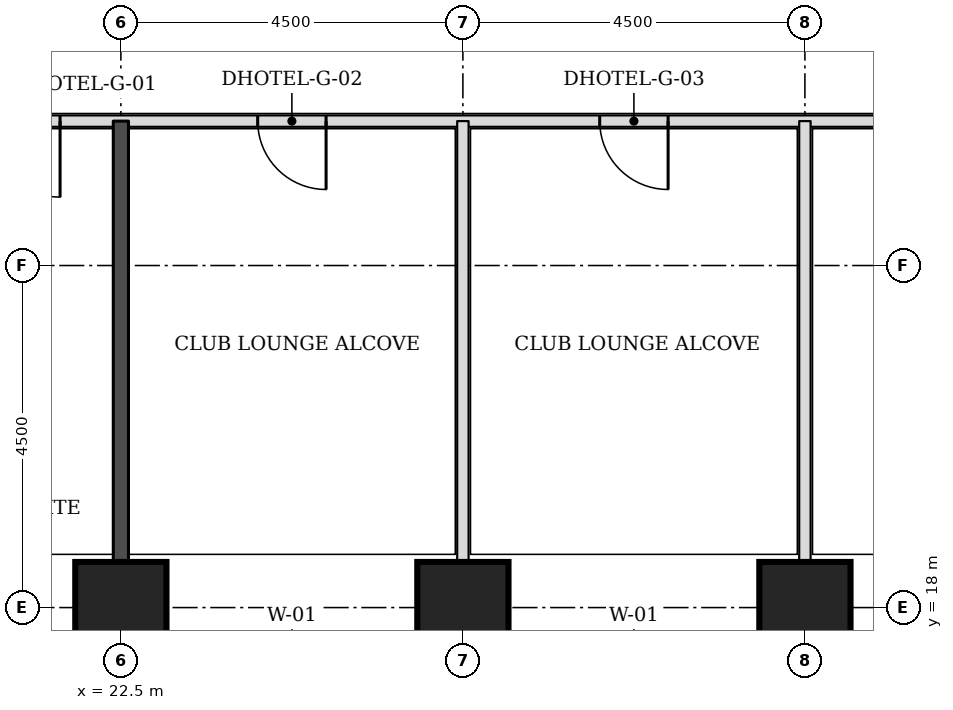
"""IFC4 building model, lengths in metres.
Left out: names, types, materials, properties, quantities, classifications, styles, units other than length and angle.
Written with IfcOpenShell. Run it as: python <this file> out.ifc"""

import sys

from ifc_helpers import new_model, si_unit, direction, frame, frame_2d, origin, origin_2d, place, context, subcontext, project, spatial, rectangle, extrude, element, fill, save


model = new_model("IFC4")
c1 = context("Model", 3, precision=1e-05, world=origin(), true_north=direction((0.0, 1.0)))
c2 = subcontext(c1, "Body", "Model", "MODEL_VIEW")
j1 = project(units=[si_unit("LENGTHUNIT", "METRE"), si_unit("PLANEANGLEUNIT", "RADIAN")], contexts=[c1])
p1 = place(None, origin())
s1 = spatial("IfcSite", under=j1, at=p1, CompositionType="ELEMENT")
p2 = place(p1, origin())
s2 = spatial("IfcBuilding", under=s1, at=p2, CompositionType="ELEMENT")
p3 = place(p2, frame((0.0, 0.0, 66.0)))
s3 = spatial("IfcBuildingStorey", under=s2, at=p3, CompositionType="ELEMENT", Elevation=66.0)
for number, where, z_axis, x_axis in (
    (1, (22.5, 18.0, 0.0), (0.0, 0.0, 1.0), (1.0, 0.0, 0.0)),
    (2, (27.0, 18.0, 0.0), (0.0, 0.0, 1.0), (1.0, 0.0, 0.0)),
    (3, (31.5, 18.0, 0.0), (0.0, 0.0, 1.0), (1.0, 0.0, 0.0)),
):
    element("IfcColumn", number, at=place(p3, frame(where, z_axis=z_axis, x_axis=x_axis)), inside=s3, PredefinedType="COLUMN", context=c2, shape_type="SweptSolid", body=[
        extrude(rectangle(XDim=1.2, YDim=1.2, at=origin_2d()), origin(), (0.0, 0.0, 1.0), 3.3),
    ])
p4 = place(p3, frame((19.9, 24.4, 0.0), z_axis=(0.0, 0.0, 1.0), x_axis=(1.0, 0.0, 0.0)))
e4 = element("IfcWall", 4, at=p4, inside=s3, PredefinedType="PARTITIONING", context=c2, shape_type="SweptSolid", body=[
    extrude(rectangle(XDim=32.2, YDim=0.15, at=frame_2d((16.1, 0.0))), origin(), (0.0, 0.0, 1.0), 3.08),
])
p5 = place(p4, frame((4.4, 0.0, 0.0)))
e5 = element("IfcOpeningElement", 5, at=p5, cuts=e4, PredefinedType="OPENING", context=c2, shape_type="SweptSolid", body=[
    extrude(rectangle(XDim=0.9, YDim=2.1, at=frame_2d((0.45, 1.05))), frame((0.0, 0.085, 0.0), z_axis=(0.0, -1.0, 0.0), x_axis=(1.0, 0.0, 0.0)), (0.0, 0.0, 1.0), 0.17),
])
p6 = place(p4, frame((8.9, 0.0, 0.0)))
e6 = element("IfcOpeningElement", 6, at=p6, cuts=e4, PredefinedType="OPENING", context=c2, shape_type="SweptSolid", body=[
    extrude(rectangle(XDim=0.9, YDim=2.1, at=frame_2d((0.45, 1.05))), frame((0.0, 0.085, 0.0), z_axis=(0.0, -1.0, 0.0), x_axis=(1.0, 0.0, 0.0)), (0.0, 0.0, 1.0), 0.17),
])
p7 = place(p4, frame((13.4, 0.0, 0.0)))
e7 = element("IfcOpeningElement", 7, at=p7, cuts=e4, PredefinedType="OPENING", context=c2, shape_type="SweptSolid", body=[
    extrude(rectangle(XDim=0.9, YDim=2.1, at=frame_2d((0.45, 1.05))), frame((0.0, 0.085, 0.0), z_axis=(0.0, -1.0, 0.0), x_axis=(1.0, 0.0, 0.0)), (0.0, 0.0, 1.0), 0.17),
])
p8 = place(p4, frame((17.9, 0.0, 0.0)))
e8 = element("IfcOpeningElement", 8, at=p8, cuts=e4, PredefinedType="OPENING", context=c2, shape_type="SweptSolid", body=[
    extrude(rectangle(XDim=0.9, YDim=2.1, at=frame_2d((0.45, 1.05))), frame((0.0, 0.085, 0.0), z_axis=(0.0, -1.0, 0.0), x_axis=(1.0, 0.0, 0.0)), (0.0, 0.0, 1.0), 0.17),
])
p9 = place(p4, frame((22.4, 0.0, 0.0)))
e9 = element("IfcOpeningElement", 9, at=p9, cuts=e4, PredefinedType="OPENING", context=c2, shape_type="SweptSolid", body=[
    extrude(rectangle(XDim=0.9, YDim=2.1, at=frame_2d((0.45, 1.05))), frame((0.0, 0.085, 0.0), z_axis=(0.0, -1.0, 0.0), x_axis=(1.0, 0.0, 0.0)), (0.0, 0.0, 1.0), 0.17),
])
p10 = place(p4, frame((26.9, 0.0, 0.0)))
e10 = element("IfcOpeningElement", 10, at=p10, cuts=e4, PredefinedType="OPENING", context=c2, shape_type="SweptSolid", body=[
    extrude(rectangle(XDim=0.9, YDim=2.1, at=frame_2d((0.45, 1.05))), frame((0.0, 0.085, 0.0), z_axis=(0.0, -1.0, 0.0), x_axis=(1.0, 0.0, 0.0)), (0.0, 0.0, 1.0), 0.17),
])
p11 = place(p4, frame((0.8, 0.0, 0.0)))
e11 = element("IfcOpeningElement", 11, at=p11, cuts=e4, PredefinedType="OPENING", context=c2, shape_type="SweptSolid", body=[
    extrude(rectangle(XDim=1.0, YDim=2.1, at=frame_2d((0.5, 1.05))), frame((0.0, 0.085, 0.0), z_axis=(0.0, -1.0, 0.0), x_axis=(1.0, 0.0, 0.0)), (0.0, 0.0, 1.0), 0.17),
])
p12 = place(p4, frame((30.4, 0.0, 0.0)))
e12 = element("IfcOpeningElement", 12, at=p12, cuts=e4, PredefinedType="OPENING", context=c2, shape_type="SweptSolid", body=[
    extrude(rectangle(XDim=1.0, YDim=2.1, at=frame_2d((0.5, 1.05))), frame((0.0, 0.085, 0.0), z_axis=(0.0, -1.0, 0.0), x_axis=(1.0, 0.0, 0.0)), (0.0, 0.0, 1.0), 0.17),
])
p13 = place(p3, frame((22.5, 18.6, 0.0), z_axis=(0.0, 0.0, 1.0), x_axis=(0.0, 1.0, 0.0)))
e13 = element("IfcWall", 13, at=p13, inside=s3, PredefinedType="SOLIDWALL", context=c2, shape_type="SweptSolid", body=[
    extrude(rectangle(XDim=5.8, YDim=0.2, at=frame_2d((2.9, 0.0))), origin(), (0.0, 0.0, 1.0), 3.08),
])
for number, where, z_axis, x_axis in (
    (14, (27.0, 18.6, 0.0), (0.0, 0.0, 1.0), (0.0, 1.0, 0.0)),
    (15, (31.5, 18.6, 0.0), (0.0, 0.0, 1.0), (0.0, 1.0, 0.0)),
):
    element("IfcWall", number, at=place(p3, frame(where, z_axis=z_axis, x_axis=x_axis)), inside=s3, PredefinedType="PARTITIONING", context=c2, shape_type="SweptSolid", body=[
        extrude(rectangle(XDim=5.8, YDim=0.15, at=frame_2d((2.9, 0.0))), origin(), (0.0, 0.0, 1.0), 3.08),
    ])
p14 = place(p5, frame((0.9, 0.0, 0.0), z_axis=(0.0, 0.0, 1.0), x_axis=(-1.0, 0.0, 0.0)))
e16 = element("IfcDoor", 16, at=p14, inside=s3, OperationType="SINGLE_SWING_LEFT", PredefinedType="DOOR", context=c2, shape_type="SweptSolid", body=[
    extrude(rectangle(XDim=0.9, YDim=2.1, at=frame_2d((0.45, 1.05))), frame((0.0, 0.025, 0.0), z_axis=(0.0, -1.0, 0.0), x_axis=(1.0, 0.0, 0.0)), (0.0, 0.0, 1.0), 0.05),
])
fill(e5, e16)
p15 = place(p6, frame((0.9, 0.0, 0.0), z_axis=(0.0, 0.0, 1.0), x_axis=(-1.0, 0.0, 0.0)))
e17 = element("IfcDoor", 17, at=p15, inside=s3, OperationType="SINGLE_SWING_LEFT", PredefinedType="DOOR", context=c2, shape_type="SweptSolid", body=[
    extrude(rectangle(XDim=0.9, YDim=2.1, at=frame_2d((0.45, 1.05))), frame((0.0, 0.025, 0.0), z_axis=(0.0, -1.0, 0.0), x_axis=(1.0, 0.0, 0.0)), (0.0, 0.0, 1.0), 0.05),
])
fill(e6, e17)
p16 = place(p11, frame((1.0, 0.0, 0.0), z_axis=(0.0, 0.0, 1.0), x_axis=(-1.0, 0.0, 0.0)))
e18 = element("IfcDoor", 18, at=p16, inside=s3, OperationType="SINGLE_SWING_LEFT", PredefinedType="DOOR", context=c2, shape_type="SweptSolid", body=[
    extrude(rectangle(XDim=1.0, YDim=2.1, at=frame_2d((0.5, 1.05))), frame((0.0, 0.025, 0.0), z_axis=(0.0, -1.0, 0.0), x_axis=(1.0, 0.0, 0.0)), (0.0, 0.0, 1.0), 0.05),
])
fill(e11, e18)
save(model, sys.argv[1])
